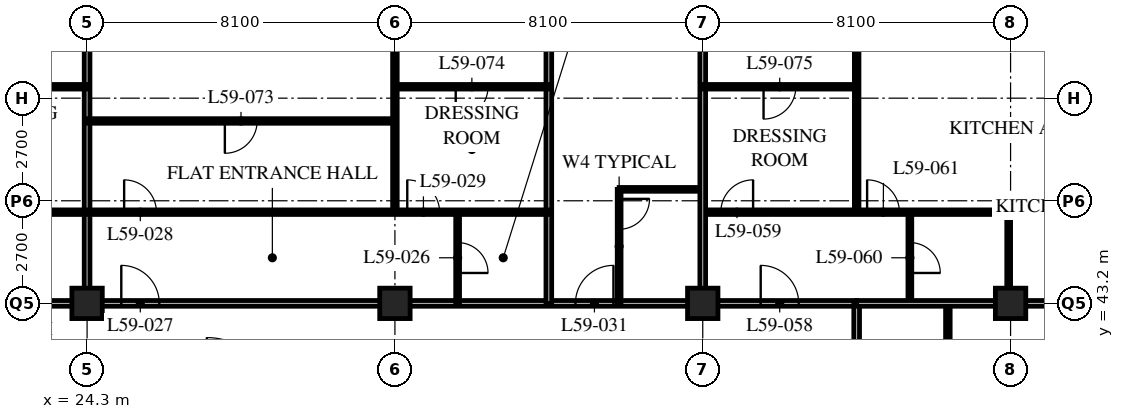
"""IFC4 building model, lengths in metres.
Left out: names, types, materials, properties, quantities, classifications, styles, units other than length and angle.
Written with IfcOpenShell. Run it as: python <this file> out.ifc"""

import sys

from ifc_helpers import new_model, si_unit, direction, frame, frame_2d, origin, origin_2d, place, context, subcontext, project, spatial, rectangle, hollow_rectangle, extrude, element, fill, save


model = new_model("IFC4")
c1 = context("Model", 3, precision=1e-05, world=origin(), true_north=direction((0.0, 1.0)))
c2 = subcontext(c1, "Body", "Model", "MODEL_VIEW")
j1 = project(units=[si_unit("LENGTHUNIT", "METRE"), si_unit("PLANEANGLEUNIT", "RADIAN")], contexts=[c1])
p1 = place(None, origin())
s1 = spatial("IfcSite", under=j1, at=p1, CompositionType="ELEMENT")
p2 = place(p1, origin())
s2 = spatial("IfcBuilding", under=s1, at=p2, CompositionType="ELEMENT")
p3 = place(p2, frame((0.0, 0.0, 228.0)))
s3 = spatial("IfcBuildingStorey", under=s2, at=p3, CompositionType="ELEMENT", Elevation=228.0)
for number, where, z_axis, x_axis in (
    (1, (24.3, 43.2, 0.0), (0.0, 0.0, 1.0), (1.0, 0.0, 0.0)),
    (2, (32.4, 43.2, 0.0), (0.0, 0.0, 1.0), (1.0, 0.0, 0.0)),
    (3, (40.5, 43.2, 0.0), (0.0, 0.0, 1.0), (1.0, 0.0, 0.0)),
    (4, (48.6, 43.2, 0.0), (0.0, 0.0, 1.0), (1.0, 0.0, 0.0)),
):
    element("IfcColumn", number, at=place(p3, frame(where, z_axis=z_axis, x_axis=x_axis)), inside=s3, PredefinedType="COLUMN", context=c2, shape_type="SweptSolid", body=[
        extrude(hollow_rectangle(XDim=0.8, YDim=0.8, WallThickness=0.08, at=origin_2d()), origin(), (0.0, 0.0, 1.0), 3.6),
    ])
p4 = place(p3, frame((8.1, 43.2, 0.0), z_axis=(0.0, 0.0, 1.0), x_axis=(1.0, 0.0, 0.0)))
e5 = element("IfcWall", 5, at=p4, inside=s3, PredefinedType="PARTITIONING", context=c2, shape_type="SweptSolid", body=[
    extrude(rectangle(XDim=36.45, YDim=0.15, at=frame_2d((18.225, 0.0))), origin(), (0.0, 0.0, 1.0), 2.628),
])
p5 = place(p4, frame((4.45, 0.0, 0.0)))
e6 = element("IfcOpeningElement", 6, at=p5, cuts=e5, PredefinedType="OPENING", context=c2, shape_type="SweptSolid", body=[
    extrude(rectangle(XDim=1.0, YDim=2.1, at=frame_2d((0.5, 1.05))), frame((0.0, 0.085, 0.0), z_axis=(0.0, -1.0, 0.0), x_axis=(1.0, 0.0, 0.0)), (0.0, 0.0, 1.0), 0.17),
])
p6 = place(p4, frame((17.1, 0.0, 0.0)))
e7 = element("IfcOpeningElement", 7, at=p6, cuts=e5, PredefinedType="OPENING", context=c2, shape_type="SweptSolid", body=[
    extrude(rectangle(XDim=1.0, YDim=2.1, at=frame_2d((0.5, 1.05))), frame((0.0, 0.085, 0.0), z_axis=(0.0, -1.0, 0.0), x_axis=(1.0, 0.0, 0.0)), (0.0, 0.0, 1.0), 0.17),
])
p7 = place(p4, frame((29.05, 0.0, 0.0)))
e8 = element("IfcOpeningElement", 8, at=p7, cuts=e5, PredefinedType="OPENING", context=c2, shape_type="SweptSolid", body=[
    extrude(rectangle(XDim=1.0, YDim=2.1, at=frame_2d((0.5, 1.05))), frame((0.0, 0.085, 0.0), z_axis=(0.0, -1.0, 0.0), x_axis=(1.0, 0.0, 0.0)), (0.0, 0.0, 1.0), 0.17),
])
p8 = place(p4, frame((33.925, 0.0, 0.0)))
e9 = element("IfcOpeningElement", 9, at=p8, cuts=e5, PredefinedType="OPENING", context=c2, shape_type="SweptSolid", body=[
    extrude(rectangle(XDim=1.0, YDim=2.1, at=frame_2d((0.5, 1.05))), frame((0.0, 0.085, 0.0), z_axis=(0.0, -1.0, 0.0), x_axis=(1.0, 0.0, 0.0)), (0.0, 0.0, 1.0), 0.17),
])
p9 = place(p4, frame((1.525, 0.0, 0.0)))
e10 = element("IfcOpeningElement", 10, at=p9, cuts=e5, PredefinedType="OPENING", context=c2, shape_type="SweptSolid", body=[
    extrude(rectangle(XDim=1.0, YDim=2.1, at=frame_2d((0.5, 1.05))), frame((0.0, 0.085, 0.0), z_axis=(0.0, -1.0, 0.0), x_axis=(1.0, 0.0, 0.0)), (0.0, 0.0, 1.0), 0.17),
])
p10 = place(p3, frame((44.55, 18.9, 0.0), z_axis=(0.0, 0.0, 1.0), x_axis=(0.0, 1.0, 0.0)))
e11 = element("IfcWall", 11, at=p10, inside=s3, PredefinedType="PARTITIONING", context=c2, shape_type="SweptSolid", body=[
    extrude(rectangle(XDim=24.3, YDim=0.15, at=frame_2d((12.15, 0.0))), origin(), (0.0, 0.0, 1.0), 3.39),
])
p11 = place(p10, frame((0.4, 0.0, 0.0)))
e12 = element("IfcOpeningElement", 12, at=p11, cuts=e11, PredefinedType="OPENING", context=c2, shape_type="SweptSolid", body=[
    extrude(rectangle(XDim=1.0, YDim=2.1, at=frame_2d((0.5, 1.05))), frame((0.0, 0.085, 0.0), z_axis=(0.0, -1.0, 0.0), x_axis=(1.0, 0.0, 0.0)), (0.0, 0.0, 1.0), 0.17),
])
p12 = place(p10, frame((16.6, 0.0, 0.0)))
e13 = element("IfcOpeningElement", 13, at=p12, cuts=e11, PredefinedType="OPENING", context=c2, shape_type="SweptSolid", body=[
    extrude(rectangle(XDim=1.0, YDim=2.1, at=frame_2d((0.5, 1.05))), frame((0.0, 0.085, 0.0), z_axis=(0.0, -1.0, 0.0), x_axis=(1.0, 0.0, 0.0)), (0.0, 0.0, 1.0), 0.17),
])
p13 = place(p3, frame((24.3, 43.2, 0.0), z_axis=(0.0, 0.0, 1.0), x_axis=(0.0, 1.0, 0.0)))
e14 = element("IfcWall", 14, at=p13, inside=s3, PredefinedType="PARTITIONING", context=c2, shape_type="SweptSolid", body=[
    extrude(rectangle(XDim=15.9, YDim=0.15, at=frame_2d((7.95, 0.0))), origin(), (0.0, 0.0, 1.0), 2.628),
])
p14 = place(p3, frame((34.05, 43.2, 0.0), z_axis=(0.0, 0.0, 1.0), x_axis=(0.0, 1.0, 0.0)))
e15 = element("IfcWall", 15, at=p14, inside=s3, PredefinedType="PARTITIONING", context=c2, shape_type="SweptSolid", body=[
    extrude(rectangle(XDim=2.4, YDim=0.1, at=frame_2d((1.2, 0.0))), origin(), (0.0, 0.0, 1.0), 3.39),
])
p15 = place(p14, frame((0.8, 0.0, 0.0)))
e16 = element("IfcOpeningElement", 16, at=p15, cuts=e15, PredefinedType="OPENING", context=c2, shape_type="SweptSolid", body=[
    extrude(rectangle(XDim=0.8, YDim=2.1, at=frame_2d((0.4, 1.05))), frame((0.0, 0.06, 0.0), z_axis=(0.0, -1.0, 0.0), x_axis=(1.0, 0.0, 0.0)), (0.0, 0.0, 1.0), 0.12),
])
p16 = place(p3, frame((32.4, 45.6, 0.0), z_axis=(0.0, 0.0, 1.0), x_axis=(0.0, 1.0, 0.0)))
e17 = element("IfcWall", 17, at=p16, inside=s3, PredefinedType="PARTITIONING", context=c2, shape_type="SweptSolid", body=[
    extrude(rectangle(XDim=13.5, YDim=0.12, at=frame_2d((6.75, 0.0))), origin(), (0.0, 0.0, 1.0), 2.628),
])
p17 = place(p3, frame((36.45, 43.2, 0.0), z_axis=(0.0, 0.0, 1.0), x_axis=(0.0, 1.0, 0.0)))
e18 = element("IfcWall", 18, at=p17, inside=s3, PredefinedType="PARTITIONING", context=c2, shape_type="SweptSolid", body=[
    extrude(rectangle(XDim=15.9, YDim=0.15, at=frame_2d((7.95, 0.0))), origin(), (0.0, 0.0, 1.0), 3.39),
])
p18 = place(p3, frame((38.3, 46.2, 0.0), z_axis=(0.0, 0.0, 1.0), x_axis=(1.0, 0.0, 0.0)))
e19 = element("IfcWall", 19, at=p18, inside=s3, PredefinedType="PARTITIONING", context=c2, shape_type="SweptSolid", body=[
    extrude(rectangle(XDim=2.2, YDim=0.1, at=frame_2d((1.1, 0.0))), origin(), (0.0, 0.0, 1.0), 3.39),
])
p19 = place(p3, frame((38.3, 43.2, 0.0), z_axis=(0.0, 0.0, 1.0), x_axis=(0.0, 1.0, 0.0)))
e20 = element("IfcWall", 20, at=p19, inside=s3, PredefinedType="PARTITIONING", context=c2, shape_type="SweptSolid", body=[
    extrude(rectangle(XDim=3.0, YDim=0.1, at=frame_2d((1.5, 0.0))), origin(), (0.0, 0.0, 1.0), 3.39),
])
p20 = place(p19, frame((1.95, 0.0, 0.0)))
e21 = element("IfcOpeningElement", 21, at=p20, cuts=e20, PredefinedType="OPENING", context=c2, shape_type="SweptSolid", body=[
    extrude(rectangle(XDim=0.8, YDim=2.1, at=frame_2d((0.4, 1.05))), frame((0.0, 0.06, 0.0), z_axis=(0.0, -1.0, 0.0), x_axis=(1.0, 0.0, 0.0)), (0.0, 0.0, 1.0), 0.12),
])
p21 = place(p3, frame((46.95, 18.9, 0.0), z_axis=(0.0, 0.0, 1.0), x_axis=(0.0, 1.0, 0.0)))
e22 = element("IfcWall", 22, at=p21, inside=s3, PredefinedType="PARTITIONING", context=c2, shape_type="SweptSolid", body=[
    extrude(rectangle(XDim=24.3, YDim=0.12, at=frame_2d((12.15, 0.0))), origin(), (0.0, 0.0, 1.0), 3.39),
])
p22 = place(p21, frame((0.975, 0.0, 0.0)))
e23 = element("IfcOpeningElement", 23, at=p22, cuts=e22, PredefinedType="OPENING", context=c2, shape_type="SweptSolid", body=[
    extrude(rectangle(XDim=0.85, YDim=2.1, at=frame_2d((0.425, 1.05))), frame((0.0, 0.07, 0.0), z_axis=(0.0, -1.0, 0.0), x_axis=(1.0, 0.0, 0.0)), (0.0, 0.0, 1.0), 0.14),
])
p23 = place(p21, frame((8.425, 0.0, 0.0)))
e24 = element("IfcOpeningElement", 24, at=p23, cuts=e22, PredefinedType="OPENING", context=c2, shape_type="SweptSolid", body=[
    extrude(rectangle(XDim=0.85, YDim=2.1, at=frame_2d((0.425, 1.05))), frame((0.0, 0.07, 0.0), z_axis=(0.0, -1.0, 0.0), x_axis=(1.0, 0.0, 0.0)), (0.0, 0.0, 1.0), 0.14),
])
p24 = place(p21, frame((12.475, 0.0, 0.0)))
e25 = element("IfcOpeningElement", 25, at=p24, cuts=e22, PredefinedType="OPENING", context=c2, shape_type="SweptSolid", body=[
    extrude(rectangle(XDim=0.85, YDim=2.1, at=frame_2d((0.425, 1.05))), frame((0.0, 0.07, 0.0), z_axis=(0.0, -1.0, 0.0), x_axis=(1.0, 0.0, 0.0)), (0.0, 0.0, 1.0), 0.14),
])
p25 = place(p21, frame((17.175, 0.0, 0.0)))
e26 = element("IfcOpeningElement", 26, at=p25, cuts=e22, PredefinedType="OPENING", context=c2, shape_type="SweptSolid", body=[
    extrude(rectangle(XDim=0.85, YDim=2.1, at=frame_2d((0.425, 1.05))), frame((0.0, 0.07, 0.0), z_axis=(0.0, -1.0, 0.0), x_axis=(1.0, 0.0, 0.0)), (0.0, 0.0, 1.0), 0.14),
])
p26 = place(p21, frame((20.575, 0.0, 0.0)))
e27 = element("IfcOpeningElement", 27, at=p26, cuts=e22, PredefinedType="OPENING", context=c2, shape_type="SweptSolid", body=[
    extrude(rectangle(XDim=0.85, YDim=2.1, at=frame_2d((0.425, 1.05))), frame((0.0, 0.07, 0.0), z_axis=(0.0, -1.0, 0.0), x_axis=(1.0, 0.0, 0.0)), (0.0, 0.0, 1.0), 0.14),
])
p27 = place(p3, frame((40.5, 45.6, 0.0), z_axis=(0.0, 0.0, 1.0), x_axis=(1.0, 0.0, 0.0)))
e28 = element("IfcWall", 28, at=p27, inside=s3, PredefinedType="PARTITIONING", context=c2, shape_type="SweptSolid", body=[
    extrude(rectangle(XDim=8.05, YDim=0.12, at=frame_2d((4.025, 0.0))), origin(), (0.0, 0.0, 1.0), 3.39),
])
p28 = place(p27, frame((0.475, 0.0, 0.0)))
e29 = element("IfcOpeningElement", 29, at=p28, cuts=e28, PredefinedType="OPENING", context=c2, shape_type="SweptSolid", body=[
    extrude(rectangle(XDim=0.85, YDim=2.1, at=frame_2d((0.425, 1.05))), frame((0.0, 0.07, 0.0), z_axis=(0.0, -1.0, 0.0), x_axis=(1.0, 0.0, 0.0)), (0.0, 0.0, 1.0), 0.14),
])
p29 = place(p27, frame((4.325, 0.0, 0.0)))
e30 = element("IfcOpeningElement", 30, at=p29, cuts=e28, PredefinedType="OPENING", context=c2, shape_type="SweptSolid", body=[
    extrude(rectangle(XDim=0.85, YDim=2.1, at=frame_2d((0.425, 1.05))), frame((0.0, 0.07, 0.0), z_axis=(0.0, -1.0, 0.0), x_axis=(1.0, 0.0, 0.0)), (0.0, 0.0, 1.0), 0.14),
])
p30 = place(p3, frame((45.95, 43.2, 0.0), z_axis=(0.0, 0.0, 1.0), x_axis=(0.0, 1.0, 0.0)))
e31 = element("IfcWall", 31, at=p30, inside=s3, PredefinedType="PARTITIONING", context=c2, shape_type="SweptSolid", body=[
    extrude(rectangle(XDim=2.4, YDim=0.1, at=frame_2d((1.2, 0.0))), origin(), (0.0, 0.0, 1.0), 3.39),
])
p31 = place(p30, frame((0.8, 0.0, 0.0)))
e32 = element("IfcOpeningElement", 32, at=p31, cuts=e31, PredefinedType="OPENING", context=c2, shape_type="SweptSolid", body=[
    extrude(rectangle(XDim=0.8, YDim=2.1, at=frame_2d((0.4, 1.05))), frame((0.0, 0.06, 0.0), z_axis=(0.0, -1.0, 0.0), x_axis=(1.0, 0.0, 0.0)), (0.0, 0.0, 1.0), 0.12),
])
p32 = place(p3, frame((48.55, 43.2, 0.0), z_axis=(0.0, 0.0, 1.0), x_axis=(0.0, 1.0, 0.0)))
e33 = element("IfcWall", 33, at=p32, inside=s3, PredefinedType="PARTITIONING", context=c2, shape_type="SweptSolid", body=[
    extrude(rectangle(XDim=2.4, YDim=0.1, at=frame_2d((1.2, 0.0))), origin(), (0.0, 0.0, 1.0), 2.628),
])
p33 = place(p3, frame((44.55, 45.6, 0.0), z_axis=(0.0, 0.0, 1.0), x_axis=(0.0, 1.0, 0.0)))
e34 = element("IfcWall", 34, at=p33, inside=s3, PredefinedType="PARTITIONING", context=c2, shape_type="SweptSolid", body=[
    extrude(rectangle(XDim=13.5, YDim=0.12, at=frame_2d((6.75, 0.0))), origin(), (0.0, 0.0, 1.0), 3.39),
])
p34 = place(p3, frame((44.55, 43.2, 0.0), z_axis=(0.0, 0.0, 1.0), x_axis=(1.0, 0.0, 0.0)))
e35 = element("IfcWall", 35, at=p34, inside=s3, PredefinedType="PARTITIONING", context=c2, shape_type="SweptSolid", body=[
    extrude(rectangle(XDim=11.85, YDim=0.15, at=frame_2d((5.925, 0.0))), origin(), (0.0, 0.0, 1.0), 2.628),
])
p35 = place(p3, frame((40.5, 43.2, 0.0), z_axis=(0.0, 0.0, 1.0), x_axis=(0.0, 1.0, 0.0)))
e36 = element("IfcWall", 36, at=p35, inside=s3, PredefinedType="PARTITIONING", context=c2, shape_type="SweptSolid", body=[
    extrude(rectangle(XDim=15.9, YDim=0.15, at=frame_2d((7.95, 0.0))), origin(), (0.0, 0.0, 1.0), 2.628),
])
p36 = place(p3, frame((4.1, 45.6, 0.0), z_axis=(0.0, 0.0, 1.0), x_axis=(1.0, 0.0, 0.0)))
e37 = element("IfcWall", 37, at=p36, inside=s3, PredefinedType="PARTITIONING", context=c2, shape_type="SweptSolid", body=[
    extrude(rectangle(XDim=32.35, YDim=0.12, at=frame_2d((16.175, 0.0))), origin(), (0.0, 0.0, 1.0), 3.39),
])
p37 = place(p36, frame((9.025, 0.0, 0.0)))
e38 = element("IfcOpeningElement", 38, at=p37, cuts=e37, PredefinedType="OPENING", context=c2, shape_type="SweptSolid", body=[
    extrude(rectangle(XDim=0.85, YDim=2.1, at=frame_2d((0.425, 1.05))), frame((0.0, 0.07, 0.0), z_axis=(0.0, -1.0, 0.0), x_axis=(1.0, 0.0, 0.0)), (0.0, 0.0, 1.0), 0.14),
])
p38 = place(p36, frame((16.475, 0.0, 0.0)))
e39 = element("IfcOpeningElement", 39, at=p38, cuts=e37, PredefinedType="OPENING", context=c2, shape_type="SweptSolid", body=[
    extrude(rectangle(XDim=0.85, YDim=2.1, at=frame_2d((0.425, 1.05))), frame((0.0, 0.07, 0.0), z_axis=(0.0, -1.0, 0.0), x_axis=(1.0, 0.0, 0.0)), (0.0, 0.0, 1.0), 0.14),
])
p39 = place(p36, frame((21.175, 0.0, 0.0)))
e40 = element("IfcOpeningElement", 40, at=p39, cuts=e37, PredefinedType="OPENING", context=c2, shape_type="SweptSolid", body=[
    extrude(rectangle(XDim=0.85, YDim=2.1, at=frame_2d((0.425, 1.05))), frame((0.0, 0.07, 0.0), z_axis=(0.0, -1.0, 0.0), x_axis=(1.0, 0.0, 0.0)), (0.0, 0.0, 1.0), 0.14),
])
p40 = place(p36, frame((28.625, 0.0, 0.0)))
e41 = element("IfcOpeningElement", 41, at=p40, cuts=e37, PredefinedType="OPENING", context=c2, shape_type="SweptSolid", body=[
    extrude(rectangle(XDim=0.85, YDim=2.1, at=frame_2d((0.425, 1.05))), frame((0.0, 0.07, 0.0), z_axis=(0.0, -1.0, 0.0), x_axis=(1.0, 0.0, 0.0)), (0.0, 0.0, 1.0), 0.14),
])
p41 = place(p36, frame((6.725, 0.0, 0.0)))
e42 = element("IfcOpeningElement", 42, at=p41, cuts=e37, PredefinedType="OPENING", context=c2, shape_type="SweptSolid", body=[
    extrude(rectangle(XDim=0.85, YDim=2.1, at=frame_2d((0.425, 1.05))), frame((0.0, 0.07, 0.0), z_axis=(0.0, -1.0, 0.0), x_axis=(1.0, 0.0, 0.0)), (0.0, 0.0, 1.0), 0.14),
])
p42 = place(p36, frame((2.875, 0.0, 0.0)))
e43 = element("IfcOpeningElement", 43, at=p42, cuts=e37, PredefinedType="OPENING", context=c2, shape_type="SweptSolid", body=[
    extrude(rectangle(XDim=0.85, YDim=2.1, at=frame_2d((0.425, 1.05))), frame((0.0, 0.07, 0.0), z_axis=(0.0, -1.0, 0.0), x_axis=(1.0, 0.0, 0.0)), (0.0, 0.0, 1.0), 0.14),
])
p43 = place(p3, frame((20.25, 48.9, 0.0), z_axis=(0.0, 0.0, 1.0), x_axis=(1.0, 0.0, 0.0)))
e44 = element("IfcWall", 44, at=p43, inside=s3, PredefinedType="PARTITIONING", context=c2, shape_type="SweptSolid", body=[
    extrude(rectangle(XDim=4.05, YDim=0.12, at=frame_2d((2.025, 0.0))), origin(), (0.0, 0.0, 1.0), 3.39),
])
p44 = place(p43, frame((1.6, 0.0, 0.0)))
e45 = element("IfcOpeningElement", 45, at=p44, cuts=e44, PredefinedType="OPENING", context=c2, shape_type="SweptSolid", body=[
    extrude(rectangle(XDim=0.85, YDim=2.1, at=frame_2d((0.425, 1.05))), frame((0.0, 0.07, 0.0), z_axis=(0.0, -1.0, 0.0), x_axis=(1.0, 0.0, 0.0)), (0.0, 0.0, 1.0), 0.14),
])
p45 = place(p3, frame((24.3, 48.0, 0.0), z_axis=(0.0, 0.0, 1.0), x_axis=(1.0, 0.0, 0.0)))
e46 = element("IfcWall", 46, at=p45, inside=s3, PredefinedType="PARTITIONING", context=c2, shape_type="SweptSolid", body=[
    extrude(rectangle(XDim=8.1, YDim=0.12, at=frame_2d((4.05, 0.0))), origin(), (0.0, 0.0, 1.0), 3.39),
])
p46 = place(p45, frame((3.625, 0.0, 0.0)))
e47 = element("IfcOpeningElement", 47, at=p46, cuts=e46, PredefinedType="OPENING", context=c2, shape_type="SweptSolid", body=[
    extrude(rectangle(XDim=0.85, YDim=2.1, at=frame_2d((0.425, 1.05))), frame((0.0, 0.07, 0.0), z_axis=(0.0, -1.0, 0.0), x_axis=(1.0, 0.0, 0.0)), (0.0, 0.0, 1.0), 0.14),
])
p47 = place(p3, frame((32.4, 48.9, 0.0), z_axis=(0.0, 0.0, 1.0), x_axis=(1.0, 0.0, 0.0)))
e48 = element("IfcWall", 48, at=p47, inside=s3, PredefinedType="PARTITIONING", context=c2, shape_type="SweptSolid", body=[
    extrude(rectangle(XDim=4.05, YDim=0.12, at=frame_2d((2.025, 0.0))), origin(), (0.0, 0.0, 1.0), 3.39),
])
p48 = place(p47, frame((1.6, 0.0, 0.0)))
e49 = element("IfcOpeningElement", 49, at=p48, cuts=e48, PredefinedType="OPENING", context=c2, shape_type="SweptSolid", body=[
    extrude(rectangle(XDim=0.85, YDim=2.1, at=frame_2d((0.425, 1.05))), frame((0.0, 0.07, 0.0), z_axis=(0.0, -1.0, 0.0), x_axis=(1.0, 0.0, 0.0)), (0.0, 0.0, 1.0), 0.14),
])
p49 = place(p3, frame((40.5, 48.9, 0.0), z_axis=(0.0, 0.0, 1.0), x_axis=(1.0, 0.0, 0.0)))
e50 = element("IfcWall", 50, at=p49, inside=s3, PredefinedType="PARTITIONING", context=c2, shape_type="SweptSolid", body=[
    extrude(rectangle(XDim=4.05, YDim=0.12, at=frame_2d((2.025, 0.0))), origin(), (0.0, 0.0, 1.0), 3.39),
])
p50 = place(p49, frame((1.6, 0.0, 0.0)))
e51 = element("IfcOpeningElement", 51, at=p50, cuts=e50, PredefinedType="OPENING", context=c2, shape_type="SweptSolid", body=[
    extrude(rectangle(XDim=0.85, YDim=2.1, at=frame_2d((0.425, 1.05))), frame((0.0, 0.07, 0.0), z_axis=(0.0, -1.0, 0.0), x_axis=(1.0, 0.0, 0.0)), (0.0, 0.0, 1.0), 0.14),
])
p51 = place(p15, origin())
e52 = element("IfcDoor", 52, at=p51, inside=s3, OperationType="SINGLE_SWING_RIGHT", PredefinedType="DOOR", context=c2, shape_type="SweptSolid", body=[
    extrude(rectangle(XDim=0.8, YDim=2.1, at=frame_2d((0.4, 1.05))), frame((0.0, 0.025, 0.0), z_axis=(0.0, -1.0, 0.0), x_axis=(1.0, 0.0, 0.0)), (0.0, 0.0, 1.0), 0.05),
])
fill(e16, e52)
p52 = place(p6, origin())
e53 = element("IfcDoor", 53, at=p52, inside=s3, OperationType="SINGLE_SWING_LEFT", PredefinedType="DOOR", context=c2, shape_type="SweptSolid", body=[
    extrude(rectangle(XDim=1.0, YDim=2.1, at=frame_2d((0.5, 1.05))), frame((0.0, 0.025, 0.0), z_axis=(0.0, -1.0, 0.0), x_axis=(1.0, 0.0, 0.0)), (0.0, 0.0, 1.0), 0.05),
])
fill(e7, e53)
p53 = place(p39, origin())
e54 = element("IfcDoor", 54, at=p53, inside=s3, OperationType="SINGLE_SWING_LEFT", PredefinedType="DOOR", context=c2, shape_type="SweptSolid", body=[
    extrude(rectangle(XDim=0.85, YDim=2.1, at=frame_2d((0.425, 1.05))), frame((0.0, 0.025, 0.0), z_axis=(0.0, -1.0, 0.0), x_axis=(1.0, 0.0, 0.0)), (0.0, 0.0, 1.0), 0.05),
])
fill(e40, e54)
p54 = place(p40, origin())
e55 = element("IfcDoor", 55, at=p54, inside=s3, OperationType="SINGLE_SWING_LEFT", PredefinedType="DOOR", context=c2, shape_type="SweptSolid", body=[
    extrude(rectangle(XDim=0.85, YDim=2.1, at=frame_2d((0.425, 1.05))), frame((0.0, 0.025, 0.0), z_axis=(0.0, -1.0, 0.0), x_axis=(1.0, 0.0, 0.0)), (0.0, 0.0, 1.0), 0.05),
])
fill(e41, e55)
p55 = place(p20, origin())
e56 = element("IfcDoor", 56, at=p55, inside=s3, OperationType="SINGLE_SWING_LEFT", PredefinedType="DOOR", context=c2, shape_type="SweptSolid", body=[
    extrude(rectangle(XDim=0.8, YDim=2.1, at=frame_2d((0.4, 1.05))), frame((0.0, 0.025, 0.0), z_axis=(0.0, -1.0, 0.0), x_axis=(1.0, 0.0, 0.0)), (0.0, 0.0, 1.0), 0.05),
])
fill(e21, e56)
p56 = place(p7, origin())
e57 = element("IfcDoor", 57, at=p56, inside=s3, OperationType="SINGLE_SWING_RIGHT", PredefinedType="DOOR", context=c2, shape_type="SweptSolid", body=[
    extrude(rectangle(XDim=1.0, YDim=2.1, at=frame_2d((0.5, 1.05))), frame((0.0, 0.025, 0.0), z_axis=(0.0, -1.0, 0.0), x_axis=(1.0, 0.0, 0.0)), (0.0, 0.0, 1.0), 0.05),
])
fill(e8, e57)
p57 = place(p8, origin())
e58 = element("IfcDoor", 58, at=p57, inside=s3, OperationType="SINGLE_SWING_LEFT", PredefinedType="DOOR", context=c2, shape_type="SweptSolid", body=[
    extrude(rectangle(XDim=1.0, YDim=2.1, at=frame_2d((0.5, 1.05))), frame((0.0, 0.025, 0.0), z_axis=(0.0, -1.0, 0.0), x_axis=(1.0, 0.0, 0.0)), (0.0, 0.0, 1.0), 0.05),
])
fill(e9, e58)
p58 = place(p28, origin())
e59 = element("IfcDoor", 59, at=p58, inside=s3, OperationType="SINGLE_SWING_RIGHT", PredefinedType="DOOR", context=c2, shape_type="SweptSolid", body=[
    extrude(rectangle(XDim=0.85, YDim=2.1, at=frame_2d((0.425, 1.05))), frame((0.0, 0.025, 0.0), z_axis=(0.0, -1.0, 0.0), x_axis=(1.0, 0.0, 0.0)), (0.0, 0.0, 1.0), 0.05),
])
fill(e29, e59)
p59 = place(p31, origin())
e60 = element("IfcDoor", 60, at=p59, inside=s3, OperationType="SINGLE_SWING_RIGHT", PredefinedType="DOOR", context=c2, shape_type="SweptSolid", body=[
    extrude(rectangle(XDim=0.8, YDim=2.1, at=frame_2d((0.4, 1.05))), frame((0.0, 0.025, 0.0), z_axis=(0.0, -1.0, 0.0), x_axis=(1.0, 0.0, 0.0)), (0.0, 0.0, 1.0), 0.05),
])
fill(e32, e60)
p60 = place(p29, origin())
e61 = element("IfcDoor", 61, at=p60, inside=s3, OperationType="SINGLE_SWING_LEFT", PredefinedType="DOOR", context=c2, shape_type="SweptSolid", body=[
    extrude(rectangle(XDim=0.85, YDim=2.1, at=frame_2d((0.425, 1.05))), frame((0.0, 0.025, 0.0), z_axis=(0.0, -1.0, 0.0), x_axis=(1.0, 0.0, 0.0)), (0.0, 0.0, 1.0), 0.05),
])
fill(e30, e61)
p61 = place(p46, origin())
e62 = element("IfcDoor", 62, at=p61, inside=s3, OperationType="SINGLE_SWING_RIGHT", PredefinedType="DOOR", context=c2, shape_type="SweptSolid", body=[
    extrude(rectangle(XDim=0.85, YDim=2.1, at=frame_2d((0.425, 1.05))), frame((0.0, 0.025, 0.0), z_axis=(0.0, -1.0, 0.0), x_axis=(1.0, 0.0, 0.0)), (0.0, 0.0, 1.0), 0.05),
])
fill(e47, e62)
p62 = place(p48, origin())
e63 = element("IfcDoor", 63, at=p62, inside=s3, OperationType="SINGLE_SWING_RIGHT", PredefinedType="DOOR", context=c2, shape_type="SweptSolid", body=[
    extrude(rectangle(XDim=0.85, YDim=2.1, at=frame_2d((0.425, 1.05))), frame((0.0, 0.025, 0.0), z_axis=(0.0, -1.0, 0.0), x_axis=(1.0, 0.0, 0.0)), (0.0, 0.0, 1.0), 0.05),
])
fill(e49, e63)
p63 = place(p50, origin())
e64 = element("IfcDoor", 64, at=p63, inside=s3, OperationType="SINGLE_SWING_RIGHT", PredefinedType="DOOR", context=c2, shape_type="SweptSolid", body=[
    extrude(rectangle(XDim=0.85, YDim=2.1, at=frame_2d((0.425, 1.05))), frame((0.0, 0.025, 0.0), z_axis=(0.0, -1.0, 0.0), x_axis=(1.0, 0.0, 0.0)), (0.0, 0.0, 1.0), 0.05),
])
fill(e51, e64)
save(model, sys.argv[1])
